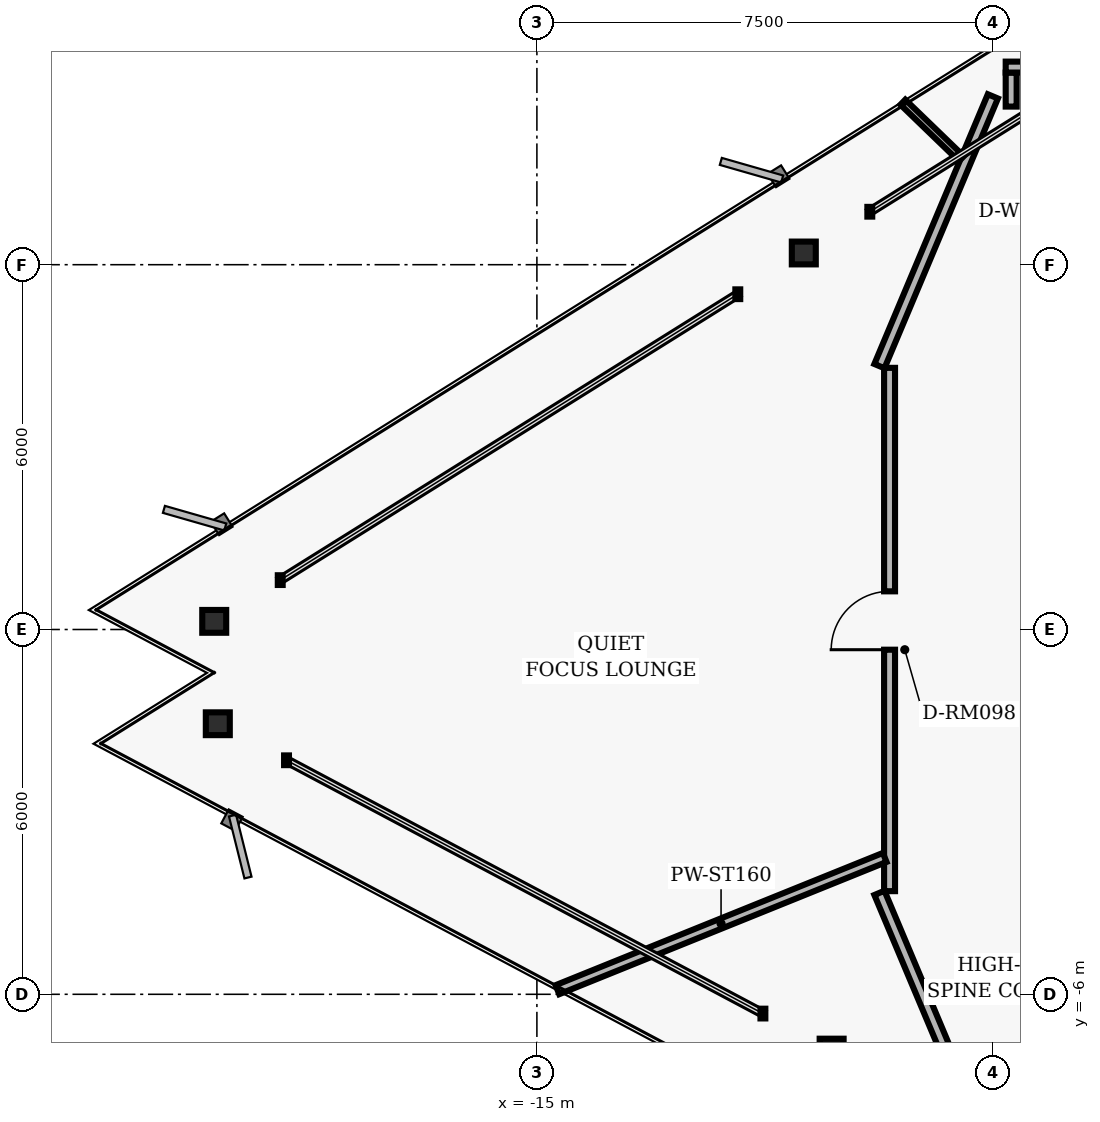
"""IFC4 building model, lengths in metres.
Left out: names, types, materials, properties, quantities, classifications, styles, units other than length and angle.
Written with IfcOpenShell. Run it as: python <this file> out.ifc"""

import sys

from ifc_helpers import new_model, si_unit, direction, frame, frame_2d, origin, origin_2d, place, context, subcontext, project, spatial, rectangle, i_section, extrude, element, fill, save


model = new_model("IFC4")
c1 = context("Model", 3, precision=1e-05, world=origin(), true_north=direction((0.0, 1.0)))
c2 = subcontext(c1, "Body", "Model", "MODEL_VIEW")
j1 = project(units=[si_unit("LENGTHUNIT", "METRE"), si_unit("PLANEANGLEUNIT", "RADIAN")], contexts=[c1])
p1 = place(None, origin())
s1 = spatial("IfcSite", under=j1, at=p1, CompositionType="ELEMENT")
p2 = place(p1, origin())
s2 = spatial("IfcBuilding", under=s1, at=p2, CompositionType="ELEMENT")
p3 = place(p2, frame((0.0, 0.0, 205.76)))
s3 = spatial("IfcBuildingStorey", under=s2, at=p3, CompositionType="ELEMENT", Elevation=205.76)
for number, where, z_axis, x_axis in (
    (1, (-10.611, 6.193, 0.0), (0.0, 0.0, 1.0), (1.0, 0.0, 0.0)),
    (2, (-20.307, 0.134, 0.0), (0.0, 0.0, 1.0), (1.0, 0.0, 0.0)),
    (3, (-20.248, -1.55, 0.0), (0.0, 0.0, 1.0), (1.0, 0.0, 0.0)),
    (4, (-10.153, -6.918, 0.0), (0.0, 0.0, 1.0), (1.0, 0.0, 0.0)),
):
    element("IfcColumn", number, at=place(p3, frame(where, z_axis=z_axis, x_axis=x_axis)), inside=s3, PredefinedType="COLUMN", context=c2, shape_type="SweptSolid", body=[
        extrude(i_section(OverallWidth=0.394, OverallDepth=0.375, WebThickness=0.017, FlangeThickness=0.028, FilletRadius=0.016, at=origin_2d()), origin(), (0.0, 0.0, 1.0), 3.04),
    ])
p4 = place(p3, frame((-7.501, -8.769, 0.0), z_axis=(0.0, 0.0, 1.0), x_axis=(-0.387573945081, 0.921838617706, 0.0)))
e5 = element("IfcWall", 5, at=p4, inside=s3, PredefinedType="PARTITIONING", context=c2, shape_type="SweptSolid", body=[
    extrude(rectangle(XDim=4.813, YDim=0.18, at=frame_2d((2.407, 0.0))), origin(), (0.0, 0.0, 1.0), 2.773),
])
p5 = place(p3, frame((-9.2, -4.303, 0.0), z_axis=(0.0, 0.0, 1.0), x_axis=(0.0, 1.0, 0.0)))
e6 = element("IfcWall", 6, at=p5, inside=s3, PredefinedType="PARTITIONING", context=c2, shape_type="SweptSolid", body=[
    extrude(rectangle(XDim=8.607, YDim=0.18, at=frame_2d((4.303, 0.0))), origin(), (0.0, 0.0, 1.0), 2.773),
])
p6 = place(p5, frame((3.971, 0.0, 0.0)))
e7 = element("IfcOpeningElement", 7, at=p6, cuts=e6, PredefinedType="OPENING", context=c2, shape_type="SweptSolid", body=[
    extrude(rectangle(XDim=0.96, YDim=2.02, at=frame_2d((0.48, 1.01))), frame((0.0, 0.1, 0.0), z_axis=(0.0, -1.0, 0.0), x_axis=(1.0, 0.0, 0.0)), (0.0, 0.0, 1.0), 0.2),
])
p7 = place(p3, frame((-9.367, 4.332, 0.0), z_axis=(0.0, 0.0, 1.0), x_axis=(0.387573945081, 0.921838617706, 0.0)))
e8 = element("IfcWall", 8, at=p7, inside=s3, PredefinedType="PARTITIONING", context=c2, shape_type="SweptSolid", body=[
    extrude(rectangle(XDim=4.813, YDim=0.18, at=frame_2d((2.407, 0.0))), origin(), (0.0, 0.0, 1.0), 2.773),
])
p8 = place(p3, frame((-7.2, 8.601, 0.0), z_axis=(0.0, 0.0, 1.0), x_axis=(0.0, 1.0, 0.0)))
e9 = element("IfcWall", 9, at=p8, inside=s3, PredefinedType="PARTITIONING", context=c2, shape_type="SweptSolid", body=[
    extrude(rectangle(XDim=0.559, YDim=0.18, at=frame_2d((0.28, 0.0))), origin(), (0.0, 0.0, 1.0), 2.773),
])
p9 = place(p3, frame((-7.29, 9.25, 0.0), z_axis=(0.0, 0.0, 1.0), x_axis=(1.0, 0.0, 0.0)))
e10 = element("IfcWall", 10, at=p9, inside=s3, PredefinedType="PARTITIONING", context=c2, shape_type="SweptSolid", body=[
    extrude(rectangle(XDim=13.3, YDim=0.18, at=frame_2d((6.65, 0.0))), origin(), (0.0, 0.0, 1.0), 2.773),
])
p10 = place(p9, frame((11.573, 0.0, 0.0)))
e11 = element("IfcOpeningElement", 11, at=p10, cuts=e10, PredefinedType="OPENING", context=c2, shape_type="SweptSolid", body=[
    extrude(rectangle(XDim=0.96, YDim=2.02, at=frame_2d((0.48, 1.01))), frame((0.0, 0.1, 0.0), z_axis=(0.0, -1.0, 0.0), x_axis=(1.0, 0.0, 0.0)), (0.0, 0.0, 1.0), 0.2),
])
p11 = place(p9, frame((5.149, 0.0, 0.0)))
e12 = element("IfcOpeningElement", 12, at=p11, cuts=e10, PredefinedType="OPENING", context=c2, shape_type="SweptSolid", body=[
    extrude(rectangle(XDim=1.02, YDim=2.02, at=frame_2d((0.51, 1.01))), frame((0.0, 0.1, 0.0), z_axis=(0.0, -1.0, 0.0), x_axis=(1.0, 0.0, 0.0)), (0.0, 0.0, 1.0), 0.2),
])
p12 = place(p3, frame((-9.28, -3.75, 0.0), z_axis=(0.0, 0.0, 1.0), x_axis=(-0.927192124848, -0.374586123102, 0.0)))
e13 = element("IfcWall", 13, at=p12, inside=s3, PredefinedType="PARTITIONING", context=c2, shape_type="SweptSolid", body=[
    extrude(rectangle(XDim=5.805, YDim=0.16, at=frame_2d((2.903, 0.0))), origin(), (0.0, 0.0, 1.0), 2.773),
])
p13 = place(p3, frame((-8.019, 7.744, 0.0), z_axis=(0.0, 0.0, 1.0), x_axis=(-0.719319685721, 0.694679199151, 0.0)))
e14 = element("IfcWall", 14, at=p13, inside=s3, PredefinedType="MOVABLE", context=c2, shape_type="SweptSolid", body=[
    extrude(rectangle(XDim=1.338, YDim=0.115, at=frame_2d((0.669, 0.0))), origin(), (0.0, 0.0, 1.0), 2.773),
])
p14 = place(p6, origin())
e15 = element("IfcDoor", 15, at=p14, inside=s3, OperationType="SINGLE_SWING_LEFT", PredefinedType="DOOR", context=c2, shape_type="SweptSolid", body=[
    extrude(rectangle(XDim=0.96, YDim=2.02, at=frame_2d((0.48, 1.01))), frame((0.0, 0.025, 0.0), z_axis=(0.0, -1.0, 0.0), x_axis=(1.0, 0.0, 0.0)), (0.0, 0.0, 1.0), 0.05),
])
fill(e7, e15)
save(model, sys.argv[1])
